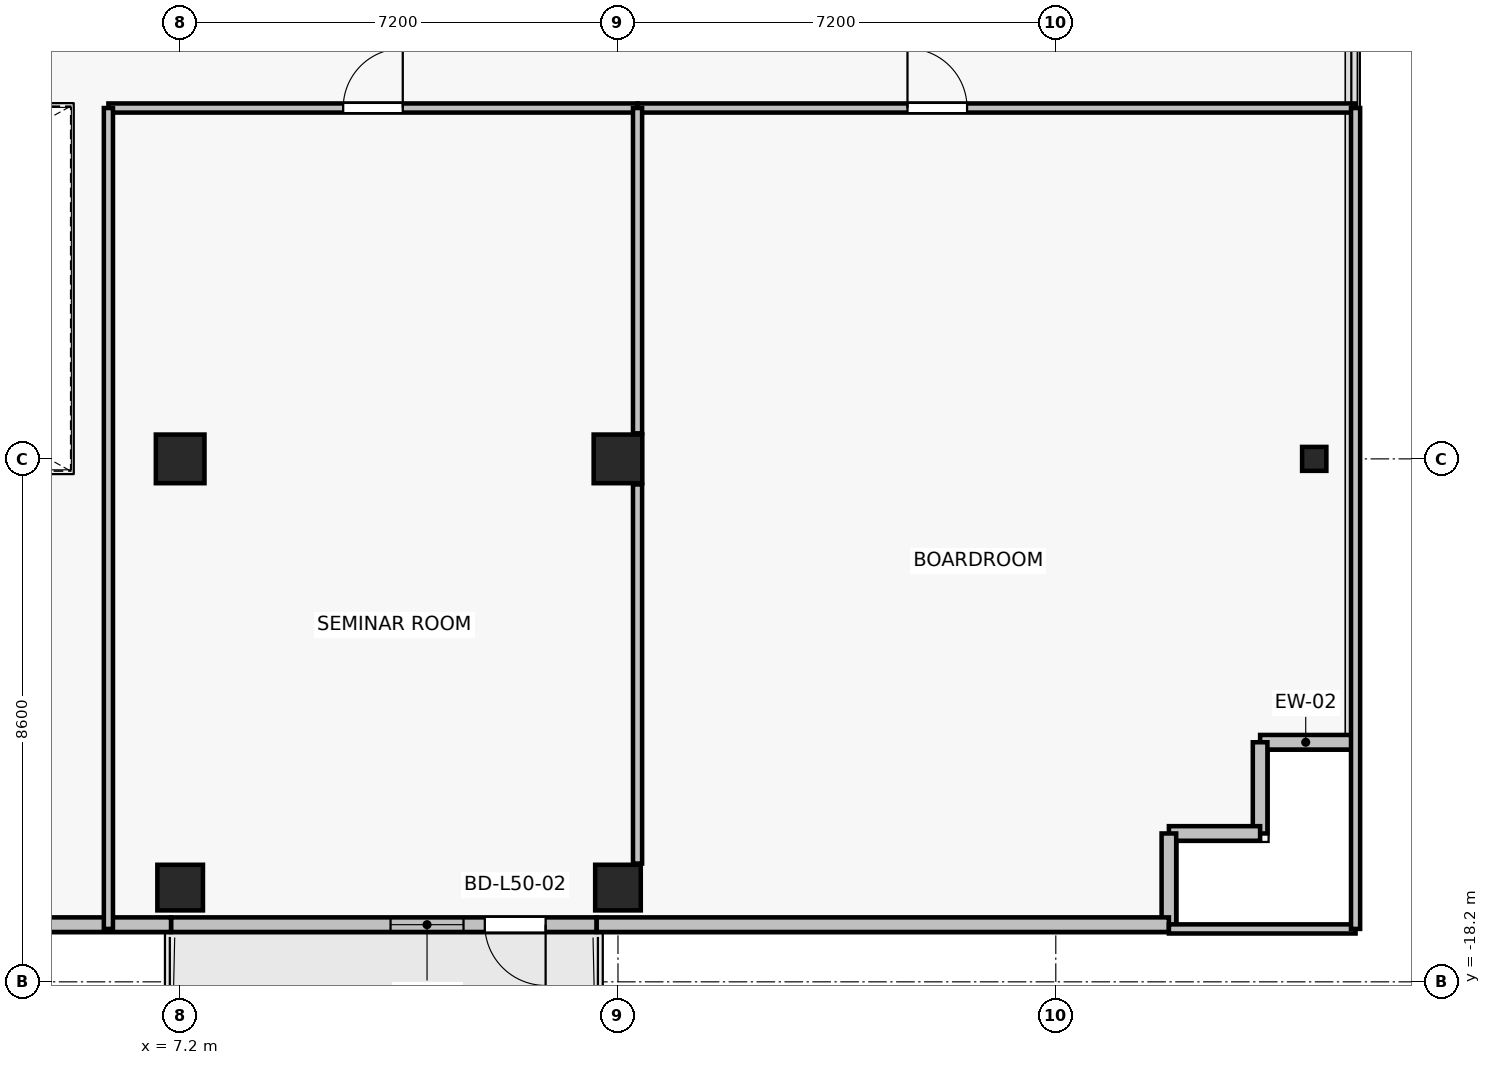
"""IFC4 building model, lengths in metres.
Left out: names, types, materials, properties, quantities, classifications, styles, units other than length and angle.
Written with IfcOpenShell. Run it as: python <this file> out.ifc"""

import sys

from ifc_helpers import new_model, si_unit, direction, frame, frame_2d, origin, origin_2d, place, context, subcontext, project, spatial, rectangle, i_section, extrude, source, transform, mapped, element, fill, save


model = new_model("IFC4")
c1 = context("Model", 3, precision=1e-05, world=origin(), true_north=direction((0.0, 1.0)))
c2 = subcontext(c1, "Body", "Model", "MODEL_VIEW")
j1 = project(units=[si_unit("LENGTHUNIT", "METRE"), si_unit("PLANEANGLEUNIT", "RADIAN")], contexts=[c1])
p1 = place(None, origin())
s1 = spatial("IfcSite", under=j1, at=p1, CompositionType="ELEMENT")
p2 = place(p1, origin())
s2 = spatial("IfcBuilding", under=s1, at=p2, CompositionType="ELEMENT")
p3 = place(p2, frame((0.0, 0.0, 179.2)))
s3 = spatial("IfcBuildingStorey", under=s2, at=p3, CompositionType="ELEMENT", Elevation=179.2)
for number, where, z_axis, x_axis in (
    (1, (7.2, -9.6, 0.0), (0.0, 0.0, 1.0), (1.0, 0.0, 0.0)),
    (2, (14.4, -9.6, 0.0), (0.0, 0.0, 1.0), (1.0, 0.0, 0.0)),
):
    element("IfcColumn", number, at=place(p3, frame(where, z_axis=z_axis, x_axis=x_axis)), inside=s3, PredefinedType="COLUMN", context=c2, shape_type="SweptSolid", body=[
        extrude(rectangle(XDim=0.8, YDim=0.8, at=origin_2d()), origin(), (0.0, 0.0, 1.0), 3.3),
    ])
for number, where, z_axis, x_axis in (
    (3, (7.2, -16.65, 0.0), (0.0, 0.0, 1.0), (1.0, 0.0, 0.0)),
    (4, (14.4, -16.65, 0.0), (0.0, 0.0, 1.0), (1.0, 0.0, 0.0)),
):
    element("IfcColumn", number, at=place(p3, frame(where, z_axis=z_axis, x_axis=x_axis)), inside=s3, PredefinedType="COLUMN", context=c2, shape_type="SweptSolid", body=[
        extrude(rectangle(XDim=0.75, YDim=0.75, at=origin_2d()), origin(), (0.0, 0.0, 1.0), 3.3),
    ])
p4 = place(p3, frame((25.85, -9.6, 0.0), z_axis=(0.0, 0.0, 1.0), x_axis=(1.0, 0.0, 0.0)))
e5 = element("IfcColumn", 5, at=p4, inside=s3, PredefinedType="COLUMN", context=c2, shape_type="SweptSolid", body=[
    extrude(i_section(OverallWidth=0.399, OverallDepth=0.394, WebThickness=0.023, FlangeThickness=0.037, FilletRadius=0.015, at=origin_2d()), origin(), (0.0, 0.0, 1.0), 3.3),
])
p5 = place(p3, frame((14.05, -17.26, 0.0), z_axis=(0.0, 0.0, 1.0), x_axis=(-1.0, 0.0, 0.0)))
e6 = element("IfcWall", 6, at=p5, inside=s3, PredefinedType="SOLIDWALL", context=c2, shape_type="SweptSolid", body=[
    extrude(rectangle(XDim=7.0, YDim=0.24, at=frame_2d((3.5, 0.0))), origin(), (0.0, 0.0, 1.0), 2.665),
])
p6 = place(p5, frame((0.84, 0.0, 0.0)))
e7 = element("IfcOpeningElement", 7, at=p6, cuts=e6, PredefinedType="OPENING", context=c2, shape_type="SweptSolid", body=[
    extrude(rectangle(XDim=1.0, YDim=2.2, at=frame_2d((0.5, 1.1))), frame((0.0, 0.13, 0.0), z_axis=(0.0, -1.0, 0.0), x_axis=(1.0, 0.0, 0.0)), (0.0, 0.0, 1.0), 0.26),
])
p7 = place(p5, frame((2.19, 0.0, 0.85)))
e8 = element("IfcOpeningElement", 8, at=p7, cuts=e6, PredefinedType="OPENING", context=c2, shape_type="SweptSolid", body=[
    extrude(rectangle(XDim=1.2, YDim=1.5, at=frame_2d((0.6, 0.75))), frame((0.0, 0.13, 0.0), z_axis=(0.0, -1.0, 0.0), x_axis=(1.0, 0.0, 0.0)), (0.0, 0.0, 1.0), 0.26),
])
for number, where, z_axis, x_axis in (
    (9, (24.96, -14.26, 0.0), (0.0, 0.0, 1.0), (1.0, 0.0, 0.0)),
    (10, (24.96, -15.76, 0.0), (0.0, 0.0, 1.0), (0.0, 1.0, 0.0)),
    (11, (23.46, -15.76, 0.0), (0.0, 0.0, 1.0), (1.0, 0.0, 0.0)),
    (12, (23.46, -17.26, 0.0), (0.0, 0.0, 1.0), (0.0, 1.0, 0.0)),
):
    element("IfcWall", number, at=place(p3, frame(where, z_axis=z_axis, x_axis=x_axis)), inside=s3, PredefinedType="SOLIDWALL", context=c2, shape_type="SweptSolid", body=[
        extrude(rectangle(XDim=1.5, YDim=0.24, at=frame_2d((0.75, 0.0))), origin(), (0.0, 0.0, 1.0), 3.075),
    ])
p8 = place(p3, frame((14.05, -17.26, 0.0), z_axis=(0.0, 0.0, 1.0), x_axis=(1.0, 0.0, 0.0)))
e13 = element("IfcWall", 13, at=p8, inside=s3, PredefinedType="SOLIDWALL", context=c2, shape_type="SweptSolid", body=[
    extrude(rectangle(XDim=9.41, YDim=0.24, at=frame_2d((4.705, 0.0))), origin(), (0.0, 0.0, 1.0), 3.075),
])
p9 = place(p3, frame((3.2, -17.26, 0.0), z_axis=(0.0, 0.0, 1.0), x_axis=(1.0, 0.0, 0.0)))
e14 = element("IfcWall", 14, at=p9, inside=s3, PredefinedType="SOLIDWALL", context=c2, shape_type="SweptSolid", body=[
    extrude(rectangle(XDim=3.85, YDim=0.24, at=frame_2d((1.925, 0.0))), origin(), (0.0, 0.0, 1.0), 3.075),
])
p10 = place(p3, frame((6.02, -3.83, 0.0), z_axis=(0.0, 0.0, 1.0), x_axis=(1.0, 0.0, 0.0)))
e15 = element("IfcWall", 15, at=p10, inside=s3, PredefinedType="PARTITIONING", context=c2, shape_type="SweptSolid", body=[
    extrude(rectangle(XDim=8.702, YDim=0.15, at=frame_2d((4.351, 0.0))), origin(), (0.0, 0.0, 1.0), 2.565),
])
p11 = place(p10, frame((3.861, 0.0, 0.0)))
e16 = element("IfcOpeningElement", 16, at=p11, cuts=e15, PredefinedType="OPENING", context=c2, shape_type="SweptSolid", body=[
    extrude(rectangle(XDim=0.98, YDim=2.15, at=frame_2d((0.49, 1.075))), frame((0.0, 0.085, 0.0), z_axis=(0.0, -1.0, 0.0), x_axis=(1.0, 0.0, 0.0)), (0.0, 0.0, 1.0), 0.17),
])
p12 = place(p3, frame((6.02, -17.33, 0.0), z_axis=(0.0, 0.0, 1.0), x_axis=(0.0, 1.0, 0.0)))
e17 = element("IfcWall", 17, at=p12, inside=s3, PredefinedType="PARTITIONING", context=c2, shape_type="SweptSolid", body=[
    extrude(rectangle(XDim=13.5, YDim=0.15, at=frame_2d((6.75, 0.0))), origin(), (0.0, 0.0, 1.0), 2.565),
])
p13 = place(p3, frame((14.722, -10.02, 0.0), z_axis=(0.0, 0.0, 1.0), x_axis=(0.0, -1.0, 0.0)))
e18 = element("IfcWall", 18, at=p13, inside=s3, PredefinedType="PARTITIONING", context=c2, shape_type="SweptSolid", body=[
    extrude(rectangle(XDim=6.235, YDim=0.15, at=frame_2d((3.117, 0.0))), origin(), (0.0, 0.0, 1.0), 3.075),
])
p14 = place(p3, frame((26.53, -17.33, 0.0), z_axis=(0.0, 0.0, 1.0), x_axis=(-1.0, 0.0, 0.0)))
e19 = element("IfcWall", 19, at=p14, inside=s3, PredefinedType="PARTITIONING", context=c2, shape_type="SweptSolid", body=[
    extrude(rectangle(XDim=3.07, YDim=0.15, at=frame_2d((1.535, 0.0))), origin(), (0.0, 0.0, 1.0), 3.075),
])
p15 = place(p3, frame((14.722, -3.83, 0.0), z_axis=(0.0, 0.0, 1.0), x_axis=(1.0, 0.0, 0.0)))
e20 = element("IfcWall", 20, at=p15, inside=s3, PredefinedType="PARTITIONING", context=c2, shape_type="SweptSolid", body=[
    extrude(rectangle(XDim=11.808, YDim=0.15, at=frame_2d((5.904, 0.0))), origin(), (0.0, 0.0, 1.0), 2.565),
])
p16 = place(p15, frame((4.439, 0.0, 0.0)))
e21 = element("IfcOpeningElement", 21, at=p16, cuts=e20, PredefinedType="OPENING", context=c2, shape_type="SweptSolid", body=[
    extrude(rectangle(XDim=0.98, YDim=2.15, at=frame_2d((0.49, 1.075))), frame((0.0, 0.085, 0.0), z_axis=(0.0, -1.0, 0.0), x_axis=(1.0, 0.0, 0.0)), (0.0, 0.0, 1.0), 0.17),
])
p17 = place(p3, frame((14.722, -9.18, 0.0), z_axis=(0.0, 0.0, 1.0), x_axis=(0.0, 1.0, 0.0)))
e22 = element("IfcWall", 22, at=p17, inside=s3, PredefinedType="PARTITIONING", context=c2, shape_type="SweptSolid", body=[
    extrude(rectangle(XDim=5.35, YDim=0.15, at=frame_2d((2.675, 0.0))), origin(), (0.0, 0.0, 1.0), 2.665),
])
p18 = place(p3, frame((26.53, -3.83, 0.0), z_axis=(0.0, 0.0, 1.0), x_axis=(0.0, -1.0, 0.0)))
e23 = element("IfcWall", 23, at=p18, inside=s3, PredefinedType="PARTITIONING", context=c2, shape_type="SweptSolid", body=[
    extrude(rectangle(XDim=13.5, YDim=0.15, at=frame_2d((6.75, 0.0))), origin(), (0.0, 0.0, 1.0), 2.665),
])
m1 = source(origin(), c2, "Body", "SweptSolid", [
    extrude(rectangle(XDim=1.0, YDim=2.2, at=frame_2d((0.5, 1.1))), frame((0.0, 0.025, 0.0), z_axis=(0.0, -1.0, 0.0), x_axis=(1.0, 0.0, 0.0)), (0.0, 0.0, 1.0), 0.05),
])
p19 = place(p6, origin())
e24 = element("IfcDoor", 24, at=p19, inside=s3, OperationType="SINGLE_SWING_LEFT", PredefinedType="DOOR", context=c2, shape_type="MappedRepresentation", body=[
    mapped(m1, transform((0.0, 0.0, 0.0), x_axis=(1.0, 0.0, 0.0), y_axis=(0.0, 1.0, 0.0), z_axis=(0.0, 0.0, 1.0), scale=1.0)),
])
fill(e7, e24)
m2 = source(origin(), c2, "Body", "SweptSolid", [
    extrude(rectangle(XDim=1.2, YDim=1.5, at=frame_2d((0.6, 0.75))), frame((0.0, 0.03, 0.0), z_axis=(0.0, -1.0, 0.0), x_axis=(1.0, 0.0, 0.0)), (0.0, 0.0, 1.0), 0.06),
])
p20 = place(p7, origin())
e25 = element("IfcWindow", 25, at=p20, inside=s3, PartitioningType="SINGLE_PANEL", PredefinedType="WINDOW", context=c2, shape_type="MappedRepresentation", body=[
    mapped(m2, transform((0.0, 0.0, 0.0), x_axis=(1.0, 0.0, 0.0), y_axis=(0.0, 1.0, 0.0), z_axis=(0.0, 0.0, 1.0), scale=1.0)),
])
fill(e8, e25)
m3 = source(origin(), c2, "Body", "SweptSolid", [
    extrude(rectangle(XDim=0.98, YDim=2.15, at=frame_2d((0.49, 1.075))), frame((0.0, 0.025, 0.0), z_axis=(0.0, -1.0, 0.0), x_axis=(1.0, 0.0, 0.0)), (0.0, 0.0, 1.0), 0.05),
])
p21 = place(p11, origin())
e26 = element("IfcDoor", 26, at=p21, inside=s3, OperationType="SINGLE_SWING_RIGHT", PredefinedType="DOOR", context=c2, shape_type="MappedRepresentation", body=[
    mapped(m3, transform((0.0, 0.0, 0.0), x_axis=(1.0, 0.0, 0.0), y_axis=(0.0, 1.0, 0.0), z_axis=(0.0, 0.0, 1.0), scale=1.0)),
])
fill(e16, e26)
p22 = place(p16, origin())
e27 = element("IfcDoor", 27, at=p22, inside=s3, OperationType="SINGLE_SWING_LEFT", PredefinedType="DOOR", context=c2, shape_type="MappedRepresentation", body=[
    mapped(m3, transform((0.0, 0.0, 0.0), x_axis=(1.0, 0.0, 0.0), y_axis=(0.0, 1.0, 0.0), z_axis=(0.0, 0.0, 1.0), scale=1.0)),
])
fill(e21, e27)
save(model, sys.argv[1])
